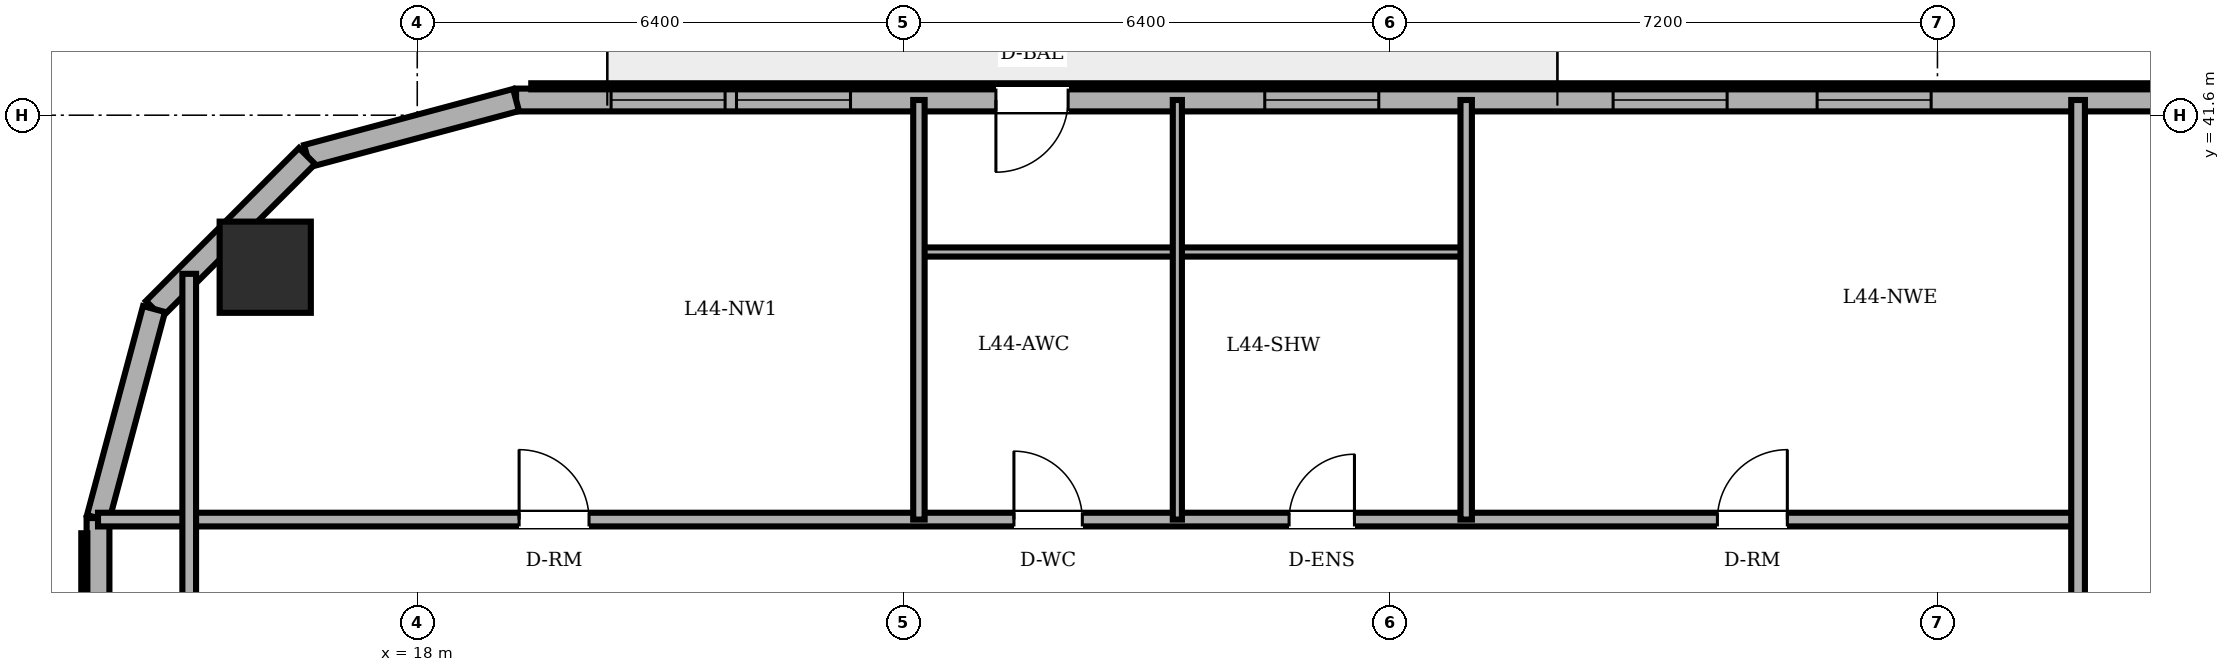
"""IFC4 building model, lengths in metres.
Left out: names, types, materials, properties, quantities, classifications, styles, units other than length and angle.
Written with IfcOpenShell. Run it as: python <this file> out.ifc"""

import sys

from ifc_helpers import new_model, si_unit, direction, frame, frame_2d, origin, origin_2d, place, context, subcontext, project, spatial, rectangle, circle, extrude, element, fill, save


model = new_model("IFC4")
c1 = context("Model", 3, precision=1e-05, world=origin(), true_north=direction((0.0, 1.0)))
c2 = subcontext(c1, "Body", "Model", "MODEL_VIEW")
j1 = project(units=[si_unit("LENGTHUNIT", "METRE"), si_unit("PLANEANGLEUNIT", "RADIAN")], contexts=[c1])
p1 = place(None, origin())
s1 = spatial("IfcSite", under=j1, at=p1, CompositionType="ELEMENT")
p2 = place(p1, origin())
s2 = spatial("IfcBuilding", under=s1, at=p2, CompositionType="ELEMENT")
p3 = place(p2, frame((0.0, 0.0, 169.0)))
s3 = spatial("IfcBuildingStorey", under=s2, at=p3, CompositionType="ELEMENT", Elevation=169.0)
p4 = place(p3, frame((16.0, 39.6, 0.0), z_axis=(0.0, 0.0, 1.0), x_axis=(1.0, 0.0, 0.0)))
e1 = element("IfcColumn", 1, at=p4, inside=s3, PredefinedType="COLUMN", context=c2, shape_type="SweptSolid", body=[
    extrude(circle(Radius=0.6, at=origin_2d()), origin(), (0.0, 0.0, 1.0), 3.6),
])
p5 = place(p3, frame((49.582, 41.8, 0.0), z_axis=(0.0, 0.0, 1.0), x_axis=(-1.0, 0.0, 0.0)))
e2 = element("IfcWall", 2, at=p5, inside=s3, PredefinedType="SOLIDWALL", context=c2, shape_type="SweptSolid", body=[
    extrude(rectangle(XDim=30.282, YDim=0.3, at=frame_2d((15.141, 0.0))), origin(), (0.0, 0.0, 1.0), 3.4),
])
p6 = place(p5, frame((23.019, 0.0, 0.0)))
e3 = element("IfcOpeningElement", 3, at=p6, cuts=e2, PredefinedType="OPENING", context=c2, shape_type="SweptSolid", body=[
    extrude(rectangle(XDim=0.95, YDim=2.2, at=frame_2d((0.475, 1.1))), frame((0.0, 0.16, 0.0), z_axis=(0.0, -1.0, 0.0), x_axis=(1.0, 0.0, 0.0)), (0.0, 0.0, 1.0), 0.32),
])
p7 = place(p5, frame((2.727, 0.0, 0.85)))
e4 = element("IfcOpeningElement", 4, at=p7, cuts=e2, PredefinedType="OPENING", context=c2, shape_type="SweptSolid", body=[
    extrude(rectangle(XDim=1.5, YDim=1.55, at=frame_2d((0.75, 0.775))), frame((0.0, 0.16, 0.0), z_axis=(0.0, -1.0, 0.0), x_axis=(1.0, 0.0, 0.0)), (0.0, 0.0, 1.0), 0.32),
])
p8 = place(p5, frame((5.855, 0.0, 0.85)))
e5 = element("IfcOpeningElement", 5, at=p8, cuts=e2, PredefinedType="OPENING", context=c2, shape_type="SweptSolid", body=[
    extrude(rectangle(XDim=1.5, YDim=1.55, at=frame_2d((0.75, 0.775))), frame((0.0, 0.16, 0.0), z_axis=(0.0, -1.0, 0.0), x_axis=(1.0, 0.0, 0.0)), (0.0, 0.0, 1.0), 0.32),
])
p9 = place(p5, frame((11.665, 0.0, 0.85)))
e6 = element("IfcOpeningElement", 6, at=p9, cuts=e2, PredefinedType="OPENING", context=c2, shape_type="SweptSolid", body=[
    extrude(rectangle(XDim=1.5, YDim=1.55, at=frame_2d((0.75, 0.775))), frame((0.0, 0.16, 0.0), z_axis=(0.0, -1.0, 0.0), x_axis=(1.0, 0.0, 0.0)), (0.0, 0.0, 1.0), 0.32),
])
p10 = place(p5, frame((14.349, 0.0, 0.85)))
e7 = element("IfcOpeningElement", 7, at=p10, cuts=e2, PredefinedType="OPENING", context=c2, shape_type="SweptSolid", body=[
    extrude(rectangle(XDim=1.5, YDim=1.55, at=frame_2d((0.75, 0.775))), frame((0.0, 0.16, 0.0), z_axis=(0.0, -1.0, 0.0), x_axis=(1.0, 0.0, 0.0)), (0.0, 0.0, 1.0), 0.32),
])
p11 = place(p5, frame((18.932, 0.0, 0.85)))
e8 = element("IfcOpeningElement", 8, at=p11, cuts=e2, PredefinedType="OPENING", context=c2, shape_type="SweptSolid", body=[
    extrude(rectangle(XDim=1.5, YDim=1.55, at=frame_2d((0.75, 0.775))), frame((0.0, 0.16, 0.0), z_axis=(0.0, -1.0, 0.0), x_axis=(1.0, 0.0, 0.0)), (0.0, 0.0, 1.0), 0.32),
])
p12 = place(p5, frame((25.882, 0.0, 0.85)))
e9 = element("IfcOpeningElement", 9, at=p12, cuts=e2, PredefinedType="OPENING", context=c2, shape_type="SweptSolid", body=[
    extrude(rectangle(XDim=1.5, YDim=1.55, at=frame_2d((0.75, 0.775))), frame((0.0, 0.16, 0.0), z_axis=(0.0, -1.0, 0.0), x_axis=(1.0, 0.0, 0.0)), (0.0, 0.0, 1.0), 0.32),
])
p13 = place(p5, frame((27.532, 0.0, 0.85)))
e10 = element("IfcOpeningElement", 10, at=p13, cuts=e2, PredefinedType="OPENING", context=c2, shape_type="SweptSolid", body=[
    extrude(rectangle(XDim=1.5, YDim=1.55, at=frame_2d((0.75, 0.775))), frame((0.0, 0.16, 0.0), z_axis=(0.0, -1.0, 0.0), x_axis=(1.0, 0.0, 0.0)), (0.0, 0.0, 1.0), 0.32),
])
p14 = place(p3, frame((19.3, 41.8, 0.0), z_axis=(0.0, 0.0, 1.0), x_axis=(-0.965908238586, -0.258884674387, 0.0)))
e11 = element("IfcWall", 11, at=p14, inside=s3, PredefinedType="SOLIDWALL", context=c2, shape_type="SweptSolid", body=[
    extrude(rectangle(XDim=2.847, YDim=0.3, at=frame_2d((1.424, 0.0))), origin(), (0.0, 0.0, 1.0), 3.4),
])
p15 = place(p3, frame((16.55, 41.063, 0.0), z_axis=(0.0, 0.0, 1.0), x_axis=(-0.707106781187, -0.707106781187, 0.0)))
e12 = element("IfcWall", 12, at=p15, inside=s3, PredefinedType="SOLIDWALL", context=c2, shape_type="SweptSolid", body=[
    extrude(rectangle(XDim=2.847, YDim=0.3, at=frame_2d((1.423, 0.0))), origin(), (0.0, 0.0, 1.0), 3.4),
])
p16 = place(p3, frame((14.537, 39.05, 0.0), z_axis=(0.0, 0.0, 1.0), x_axis=(-0.258884674387, -0.965908238586, 0.0)))
e13 = element("IfcWall", 13, at=p16, inside=s3, PredefinedType="SOLIDWALL", context=c2, shape_type="SweptSolid", body=[
    extrude(rectangle(XDim=2.847, YDim=0.3, at=frame_2d((1.424, 0.0))), origin(), (0.0, 0.0, 1.0), 3.4),
])
p17 = place(p3, frame((13.8, 36.3, 0.0), z_axis=(0.0, 0.0, 1.0), x_axis=(0.0, -1.0, 0.0)))
e14 = element("IfcWall", 14, at=p17, inside=s3, PredefinedType="SOLIDWALL", context=c2, shape_type="SweptSolid", body=[
    extrude(rectangle(XDim=24.6, YDim=0.3, at=frame_2d((12.3, 0.0))), origin(), (0.0, 0.0, 1.0), 3.4),
])
p18 = place(p17, frame((5.003, 0.0, 0.85)))
e15 = element("IfcOpeningElement", 15, at=p18, cuts=e14, PredefinedType="OPENING", context=c2, shape_type="SweptSolid", body=[
    extrude(rectangle(XDim=1.5, YDim=1.55, at=frame_2d((0.75, 0.775))), frame((0.0, 0.16, 0.0), z_axis=(0.0, -1.0, 0.0), x_axis=(1.0, 0.0, 0.0)), (0.0, 0.0, 1.0), 0.32),
])
p19 = place(p17, frame((8.277, 0.0, 0.85)))
e16 = element("IfcOpeningElement", 16, at=p19, cuts=e14, PredefinedType="OPENING", context=c2, shape_type="SweptSolid", body=[
    extrude(rectangle(XDim=1.5, YDim=1.55, at=frame_2d((0.75, 0.775))), frame((0.0, 0.16, 0.0), z_axis=(0.0, -1.0, 0.0), x_axis=(1.0, 0.0, 0.0)), (0.0, 0.0, 1.0), 0.32),
])
p20 = place(p17, frame((14.823, 0.0, 0.85)))
e17 = element("IfcOpeningElement", 17, at=p20, cuts=e14, PredefinedType="OPENING", context=c2, shape_type="SweptSolid", body=[
    extrude(rectangle(XDim=1.5, YDim=1.55, at=frame_2d((0.75, 0.775))), frame((0.0, 0.16, 0.0), z_axis=(0.0, -1.0, 0.0), x_axis=(1.0, 0.0, 0.0)), (0.0, 0.0, 1.0), 0.32),
])
p21 = place(p17, frame((18.097, 0.0, 0.85)))
e18 = element("IfcOpeningElement", 18, at=p21, cuts=e14, PredefinedType="OPENING", context=c2, shape_type="SweptSolid", body=[
    extrude(rectangle(XDim=1.5, YDim=1.55, at=frame_2d((0.75, 0.775))), frame((0.0, 0.16, 0.0), z_axis=(0.0, -1.0, 0.0), x_axis=(1.0, 0.0, 0.0)), (0.0, 0.0, 1.0), 0.32),
])
p22 = place(p3, frame((13.8, 36.28, 0.0), z_axis=(0.0, 0.0, 1.0), x_axis=(1.0, 0.0, 0.0)))
e19 = element("IfcWall", 19, at=p22, inside=s3, PredefinedType="PARTITIONING", context=c2, shape_type="SweptSolid", body=[
    extrude(rectangle(XDim=26.05, YDim=0.18, at=frame_2d((13.025, 0.0))), origin(), (0.0, 0.0, 1.0), 3.4),
])
p23 = place(p22, frame((12.05, 0.0, 0.0)))
e20 = element("IfcOpeningElement", 20, at=p23, cuts=e19, PredefinedType="OPENING", context=c2, shape_type="SweptSolid", body=[
    extrude(rectangle(XDim=0.9, YDim=2.1, at=frame_2d((0.45, 1.05))), frame((0.0, 0.1, 0.0), z_axis=(0.0, -1.0, 0.0), x_axis=(1.0, 0.0, 0.0)), (0.0, 0.0, 1.0), 0.2),
])
p24 = place(p22, frame((15.67, 0.0, 0.0)))
e21 = element("IfcOpeningElement", 21, at=p24, cuts=e19, PredefinedType="OPENING", context=c2, shape_type="SweptSolid", body=[
    extrude(rectangle(XDim=0.86, YDim=2.1, at=frame_2d((0.43, 1.05))), frame((0.0, 0.1, 0.0), z_axis=(0.0, -1.0, 0.0), x_axis=(1.0, 0.0, 0.0)), (0.0, 0.0, 1.0), 0.2),
])
p25 = place(p22, frame((5.54, 0.0, 0.0)))
e22 = element("IfcOpeningElement", 22, at=p25, cuts=e19, PredefinedType="OPENING", context=c2, shape_type="SweptSolid", body=[
    extrude(rectangle(XDim=0.92, YDim=2.1, at=frame_2d((0.46, 1.05))), frame((0.0, 0.1, 0.0), z_axis=(0.0, -1.0, 0.0), x_axis=(1.0, 0.0, 0.0)), (0.0, 0.0, 1.0), 0.2),
])
p26 = place(p22, frame((21.305, 0.0, 0.0)))
e23 = element("IfcOpeningElement", 23, at=p26, cuts=e19, PredefinedType="OPENING", context=c2, shape_type="SweptSolid", body=[
    extrude(rectangle(XDim=0.92, YDim=2.1, at=frame_2d((0.46, 1.05))), frame((0.0, 0.1, 0.0), z_axis=(0.0, -1.0, 0.0), x_axis=(1.0, 0.0, 0.0)), (0.0, 0.0, 1.0), 0.2),
])
p27 = place(p3, frame((24.6, 39.8, 0.0), z_axis=(0.0, 0.0, 1.0), x_axis=(1.0, 0.0, 0.0)))
e24 = element("IfcWall", 24, at=p27, inside=s3, PredefinedType="PARTITIONING", context=c2, shape_type="SweptSolid", body=[
    extrude(rectangle(XDim=7.2, YDim=0.12, at=frame_2d((3.6, 0.0))), origin(), (0.0, 0.0, 1.0), 2.882),
])
p28 = place(p3, frame((15.0, 33.82, 0.0), z_axis=(0.0, 0.0, 1.0), x_axis=(0.0, 1.0, 0.0)))
e25 = element("IfcWall", 25, at=p28, inside=s3, PredefinedType="PARTITIONING", context=c2, shape_type="SweptSolid", body=[
    extrude(rectangle(XDim=5.693, YDim=0.18, at=frame_2d((2.846, 0.0))), origin(), (0.0, 0.0, 1.0), 3.4),
])
p29 = place(p3, frame((24.6, 36.28, 0.0), z_axis=(0.0, 0.0, 1.0), x_axis=(0.0, 1.0, 0.0)))
e26 = element("IfcWall", 26, at=p29, inside=s3, PredefinedType="PARTITIONING", context=c2, shape_type="SweptSolid", body=[
    extrude(rectangle(XDim=5.52, YDim=0.15, at=frame_2d((2.76, 0.0))), origin(), (0.0, 0.0, 1.0), 3.4),
])
p30 = place(p3, frame((28.0, 36.28, 0.0), z_axis=(0.0, 0.0, 1.0), x_axis=(0.0, 1.0, 0.0)))
e27 = element("IfcWall", 27, at=p30, inside=s3, PredefinedType="PARTITIONING", context=c2, shape_type="SweptSolid", body=[
    extrude(rectangle(XDim=5.52, YDim=0.12, at=frame_2d((2.76, 0.0))), origin(), (0.0, 0.0, 1.0), 3.4),
])
p31 = place(p3, frame((31.8, 36.28, 0.0), z_axis=(0.0, 0.0, 1.0), x_axis=(0.0, 1.0, 0.0)))
e28 = element("IfcWall", 28, at=p31, inside=s3, PredefinedType="PARTITIONING", context=c2, shape_type="SweptSolid", body=[
    extrude(rectangle(XDim=5.52, YDim=0.15, at=frame_2d((2.76, 0.0))), origin(), (0.0, 0.0, 1.0), 3.4),
])
p32 = place(p3, frame((39.85, 14.18, 0.0), z_axis=(0.0, 0.0, 1.0), x_axis=(0.0, 1.0, 0.0)))
e29 = element("IfcWall", 29, at=p32, inside=s3, PredefinedType="PARTITIONING", context=c2, shape_type="SweptSolid", body=[
    extrude(rectangle(XDim=27.62, YDim=0.18, at=frame_2d((13.81, 0.0))), origin(), (0.0, 0.0, 1.0), 3.4),
])
p33 = place(p32, frame((14.47, 0.0, 0.0)))
e30 = element("IfcOpeningElement", 30, at=p33, cuts=e29, PredefinedType="OPENING", context=c2, shape_type="SweptSolid", body=[
    extrude(rectangle(XDim=0.92, YDim=2.1, at=frame_2d((0.46, 1.05))), frame((0.0, 0.1, 0.0), z_axis=(0.0, -1.0, 0.0), x_axis=(1.0, 0.0, 0.0)), (0.0, 0.0, 1.0), 0.2),
])
p34 = place(p6, origin())
e31 = element("IfcDoor", 31, at=p34, inside=s3, OperationType="SINGLE_SWING_RIGHT", PredefinedType="DOOR", context=c2, shape_type="SweptSolid", body=[
    extrude(rectangle(XDim=0.95, YDim=2.2, at=frame_2d((0.475, 1.1))), frame((0.0, 0.025, 0.0), z_axis=(0.0, -1.0, 0.0), x_axis=(1.0, 0.0, 0.0)), (0.0, 0.0, 1.0), 0.05),
])
fill(e3, e31)
p35 = place(p9, origin())
e32 = element("IfcWindow", 32, at=p35, inside=s3, PartitioningType="DOUBLE_PANEL_VERTICAL", PredefinedType="WINDOW", context=c2, shape_type="SweptSolid", body=[
    extrude(rectangle(XDim=1.5, YDim=1.55, at=frame_2d((0.75, 0.775))), frame((0.0, 0.03, 0.0), z_axis=(0.0, -1.0, 0.0), x_axis=(1.0, 0.0, 0.0)), (0.0, 0.0, 1.0), 0.06),
])
fill(e6, e32)
p36 = place(p10, origin())
e33 = element("IfcWindow", 33, at=p36, inside=s3, PartitioningType="DOUBLE_PANEL_VERTICAL", PredefinedType="WINDOW", context=c2, shape_type="SweptSolid", body=[
    extrude(rectangle(XDim=1.5, YDim=1.55, at=frame_2d((0.75, 0.775))), frame((0.0, 0.03, 0.0), z_axis=(0.0, -1.0, 0.0), x_axis=(1.0, 0.0, 0.0)), (0.0, 0.0, 1.0), 0.06),
])
fill(e7, e33)
p37 = place(p11, origin())
e34 = element("IfcWindow", 34, at=p37, inside=s3, PartitioningType="DOUBLE_PANEL_VERTICAL", PredefinedType="WINDOW", context=c2, shape_type="SweptSolid", body=[
    extrude(rectangle(XDim=1.5, YDim=1.55, at=frame_2d((0.75, 0.775))), frame((0.0, 0.03, 0.0), z_axis=(0.0, -1.0, 0.0), x_axis=(1.0, 0.0, 0.0)), (0.0, 0.0, 1.0), 0.06),
])
fill(e8, e34)
p38 = place(p12, origin())
e35 = element("IfcWindow", 35, at=p38, inside=s3, PartitioningType="DOUBLE_PANEL_VERTICAL", PredefinedType="WINDOW", context=c2, shape_type="SweptSolid", body=[
    extrude(rectangle(XDim=1.5, YDim=1.55, at=frame_2d((0.75, 0.775))), frame((0.0, 0.03, 0.0), z_axis=(0.0, -1.0, 0.0), x_axis=(1.0, 0.0, 0.0)), (0.0, 0.0, 1.0), 0.06),
])
fill(e9, e35)
p39 = place(p13, origin())
e36 = element("IfcWindow", 36, at=p39, inside=s3, PartitioningType="DOUBLE_PANEL_VERTICAL", PredefinedType="WINDOW", context=c2, shape_type="SweptSolid", body=[
    extrude(rectangle(XDim=1.5, YDim=1.55, at=frame_2d((0.75, 0.775))), frame((0.0, 0.03, 0.0), z_axis=(0.0, -1.0, 0.0), x_axis=(1.0, 0.0, 0.0)), (0.0, 0.0, 1.0), 0.06),
])
fill(e10, e36)
p40 = place(p23, origin())
e37 = element("IfcDoor", 37, at=p40, inside=s3, OperationType="SINGLE_SWING_LEFT", PredefinedType="DOOR", context=c2, shape_type="SweptSolid", body=[
    extrude(rectangle(XDim=0.9, YDim=2.1, at=frame_2d((0.45, 1.05))), frame((0.0, 0.025, 0.0), z_axis=(0.0, -1.0, 0.0), x_axis=(1.0, 0.0, 0.0)), (0.0, 0.0, 1.0), 0.05),
])
fill(e20, e37)
p41 = place(p24, origin())
e38 = element("IfcDoor", 38, at=p41, inside=s3, OperationType="SINGLE_SWING_RIGHT", PredefinedType="DOOR", context=c2, shape_type="SweptSolid", body=[
    extrude(rectangle(XDim=0.86, YDim=2.1, at=frame_2d((0.43, 1.05))), frame((0.0, 0.025, 0.0), z_axis=(0.0, -1.0, 0.0), x_axis=(1.0, 0.0, 0.0)), (0.0, 0.0, 1.0), 0.05),
])
fill(e21, e38)
p42 = place(p25, origin())
e39 = element("IfcDoor", 39, at=p42, inside=s3, OperationType="SINGLE_SWING_LEFT", PredefinedType="DOOR", context=c2, shape_type="SweptSolid", body=[
    extrude(rectangle(XDim=0.92, YDim=2.1, at=frame_2d((0.46, 1.05))), frame((0.0, 0.025, 0.0), z_axis=(0.0, -1.0, 0.0), x_axis=(1.0, 0.0, 0.0)), (0.0, 0.0, 1.0), 0.05),
])
fill(e22, e39)
p43 = place(p26, origin())
e40 = element("IfcDoor", 40, at=p43, inside=s3, OperationType="SINGLE_SWING_RIGHT", PredefinedType="DOOR", context=c2, shape_type="SweptSolid", body=[
    extrude(rectangle(XDim=0.92, YDim=2.1, at=frame_2d((0.46, 1.05))), frame((0.0, 0.025, 0.0), z_axis=(0.0, -1.0, 0.0), x_axis=(1.0, 0.0, 0.0)), (0.0, 0.0, 1.0), 0.05),
])
fill(e23, e40)
save(model, sys.argv[1])
